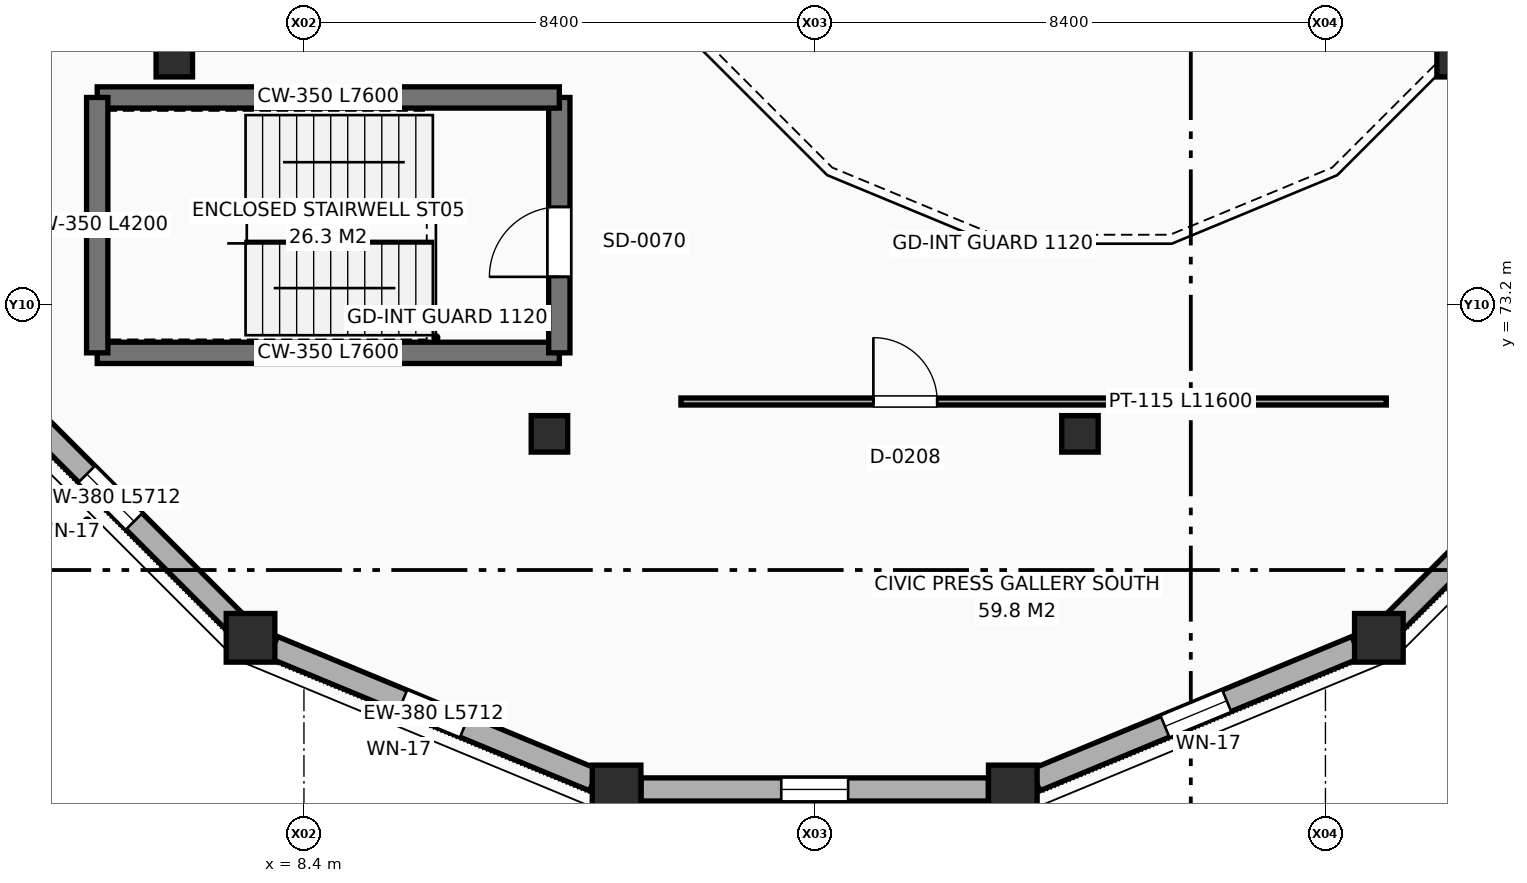
"""IFC4 building model, lengths in metres.
Left out: names, types, materials, properties, quantities, classifications, styles, units other than length and angle.
Written with IfcOpenShell. Run it as: python <this file> out.ifc"""

import sys

from ifc_helpers import new_model, si_unit, direction, frame, frame_2d, origin, origin_2d, place, context, subcontext, project, spatial, rectangle, circle, extrude, element, fill, save


model = new_model("IFC4")
c1 = context("Model", 3, precision=1e-05, world=origin(), true_north=direction((0.0, 1.0)))
c2 = subcontext(c1, "Body", "Model", "MODEL_VIEW")
j1 = project(units=[si_unit("LENGTHUNIT", "METRE"), si_unit("PLANEANGLEUNIT", "RADIAN")], contexts=[c1])
p1 = place(None, origin())
s1 = spatial("IfcSite", under=j1, at=p1, CompositionType="ELEMENT")
p2 = place(p1, origin())
s2 = spatial("IfcBuilding", under=s1, at=p2, CompositionType="ELEMENT")
p3 = place(p2, frame((0.0, 0.0, 9.6)))
s3 = spatial("IfcBuildingStorey", under=s2, at=p3, CompositionType="ELEMENT", Elevation=9.6)
for number, where, z_axis, x_axis in (
    (1, (7.521, 67.714, 0.0), (0.0, 0.0, 1.0), (1.0, 0.0, 0.0)),
    (2, (13.542, 65.22, 0.0), (0.0, 0.0, 1.0), (1.0, 0.0, 0.0)),
    (3, (20.058, 65.22, 0.0), (0.0, 0.0, 1.0), (1.0, 0.0, 0.0)),
    (4, (26.079, 67.714, 0.0), (0.0, 0.0, 1.0), (1.0, 0.0, 0.0)),
):
    element("IfcColumn", number, at=place(p3, frame(where, z_axis=z_axis, x_axis=x_axis)), inside=s3, PredefinedType="COLUMN", context=c2, shape_type="SweptSolid", body=[
        extrude(circle(Radius=0.4, at=origin_2d()), origin(), (0.0, 0.0, 1.0), 4.2),
    ])
for number, where, z_axis, x_axis in (
    (5, (6.268, 77.237, 0.0), (0.0, 0.0, 1.0), (1.0, 0.0, 0.0)),
    (6, (12.438, 71.068, 0.0), (0.0, 0.0, 1.0), (1.0, 0.0, 0.0)),
    (7, (21.163, 71.068, 0.0), (0.0, 0.0, 1.0), (1.0, 0.0, 0.0)),
    (8, (27.332, 77.237, 0.0), (0.0, 0.0, 1.0), (1.0, 0.0, 0.0)),
):
    element("IfcColumn", number, at=place(p3, frame(where, z_axis=z_axis, x_axis=x_axis)), inside=s3, PredefinedType="COLUMN", context=c2, shape_type="SweptSolid", body=[
        extrude(circle(Radius=0.3, at=origin_2d()), origin(), (0.0, 0.0, 1.0), 4.2),
    ])
p4 = place(p3, frame((3.198, 72.037, 0.0), z_axis=(0.0, 0.0, 1.0), x_axis=(0.707128150708, -0.707085411019, 0.0)))
e9 = element("IfcWall", 9, at=p4, inside=s3, PredefinedType="SOLIDWALL", context=c2, shape_type="SweptSolid", body=[
    extrude(rectangle(XDim=5.712, YDim=0.38, at=frame_2d((2.856, 0.0))), origin(), (0.0, 0.0, 1.0), 3.13),
])
p5 = place(p4, frame((2.306, 0.0, 0.9)))
e10 = element("IfcOpeningElement", 10, at=p5, cuts=e9, PredefinedType="OPENING", context=c2, shape_type="SweptSolid", body=[
    extrude(rectangle(XDim=1.1, YDim=1.8, at=frame_2d((0.55, 0.9))), frame((0.0, 0.2, 0.0), z_axis=(0.0, -1.0, 0.0), x_axis=(1.0, 0.0, 0.0)), (0.0, 0.0, 1.0), 0.4),
])
p6 = place(p3, frame((7.893, 67.56, 0.0), z_axis=(0.0, 0.0, 1.0), x_axis=(0.923880357201, -0.382681441383, 0.0)))
e11 = element("IfcWall", 11, at=p6, inside=s3, PredefinedType="SOLIDWALL", context=c2, shape_type="SweptSolid", body=[
    extrude(rectangle(XDim=5.712, YDim=0.38, at=frame_2d((2.856, 0.0))), origin(), (0.0, 0.0, 1.0), 3.13),
])
p7 = place(p6, frame((2.306, 0.0, 0.9)))
e12 = element("IfcOpeningElement", 12, at=p7, cuts=e11, PredefinedType="OPENING", context=c2, shape_type="SweptSolid", body=[
    extrude(rectangle(XDim=1.1, YDim=1.8, at=frame_2d((0.55, 0.9))), frame((0.0, 0.2, 0.0), z_axis=(0.0, -1.0, 0.0), x_axis=(1.0, 0.0, 0.0)), (0.0, 0.0, 1.0), 0.4),
])
p8 = place(p3, frame((13.944, 65.22, 0.0), z_axis=(0.0, 0.0, 1.0), x_axis=(1.0, 0.0, 0.0)))
e13 = element("IfcWall", 13, at=p8, inside=s3, PredefinedType="SOLIDWALL", context=c2, shape_type="SweptSolid", body=[
    extrude(rectangle(XDim=5.712, YDim=0.38, at=frame_2d((2.856, 0.0))), origin(), (0.0, 0.0, 1.0), 3.13),
])
p9 = place(p8, frame((2.306, 0.0, 0.9)))
e14 = element("IfcOpeningElement", 14, at=p9, cuts=e13, PredefinedType="OPENING", context=c2, shape_type="SweptSolid", body=[
    extrude(rectangle(XDim=1.1, YDim=1.8, at=frame_2d((0.55, 0.9))), frame((0.0, 0.2, 0.0), z_axis=(0.0, -1.0, 0.0), x_axis=(1.0, 0.0, 0.0)), (0.0, 0.0, 1.0), 0.4),
])
p10 = place(p3, frame((20.43, 65.374, 0.0), z_axis=(0.0, 0.0, 1.0), x_axis=(0.923874097972, 0.382696552241, 0.0)))
e15 = element("IfcWall", 15, at=p10, inside=s3, PredefinedType="SOLIDWALL", context=c2, shape_type="SweptSolid", body=[
    extrude(rectangle(XDim=5.712, YDim=0.38, at=frame_2d((2.856, 0.0))), origin(), (0.0, 0.0, 1.0), 3.13),
])
p11 = place(p10, frame((2.306, 0.0, 0.9)))
e16 = element("IfcOpeningElement", 16, at=p11, cuts=e15, PredefinedType="OPENING", context=c2, shape_type="SweptSolid", body=[
    extrude(rectangle(XDim=1.1, YDim=1.8, at=frame_2d((0.55, 0.9))), frame((0.0, 0.2, 0.0), z_axis=(0.0, -1.0, 0.0), x_axis=(1.0, 0.0, 0.0)), (0.0, 0.0, 1.0), 0.4),
])
p12 = place(p3, frame((26.363, 67.998, 0.0), z_axis=(0.0, 0.0, 1.0), x_axis=(0.707128150708, 0.707085411019, 0.0)))
e17 = element("IfcWall", 17, at=p12, inside=s3, PredefinedType="SOLIDWALL", context=c2, shape_type="SweptSolid", body=[
    extrude(rectangle(XDim=5.712, YDim=0.38, at=frame_2d((2.856, 0.0))), origin(), (0.0, 0.0, 1.0), 3.13),
])
p13 = place(p12, frame((2.306, 0.0, 0.9)))
e18 = element("IfcOpeningElement", 18, at=p13, cuts=e17, PredefinedType="OPENING", context=c2, shape_type="SweptSolid", body=[
    extrude(rectangle(XDim=1.1, YDim=1.8, at=frame_2d((0.55, 0.9))), frame((0.0, 0.2, 0.0), z_axis=(0.0, -1.0, 0.0), x_axis=(1.0, 0.0, 0.0)), (0.0, 0.0, 1.0), 0.4),
])
p14 = place(p3, frame((5.0, 72.4, 0.0), z_axis=(0.0, 0.0, 1.0), x_axis=(1.0, 0.0, 0.0)))
e19 = element("IfcWall", 19, at=p14, inside=s3, PredefinedType="SHEAR", context=c2, shape_type="SweptSolid", body=[
    extrude(rectangle(XDim=7.6, YDim=0.35, at=frame_2d((3.8, 0.0))), origin(), (0.0, 0.0, 1.0), 3.92),
])
p15 = place(p3, frame((12.6, 72.4, 0.0), z_axis=(0.0, 0.0, 1.0), x_axis=(0.0, 1.0, 0.0)))
e20 = element("IfcWall", 20, at=p15, inside=s3, PredefinedType="SHEAR", context=c2, shape_type="SweptSolid", body=[
    extrude(rectangle(XDim=4.2, YDim=0.35, at=frame_2d((2.1, 0.0))), origin(), (0.0, 0.0, 1.0), 3.92),
])
p16 = place(p15, frame((1.25, 0.0, 0.0)))
e21 = element("IfcOpeningElement", 21, at=p16, cuts=e20, PredefinedType="OPENING", context=c2, shape_type="SweptSolid", body=[
    extrude(rectangle(XDim=1.15, YDim=2.2, at=frame_2d((0.575, 1.1))), frame((0.0, 0.185, 0.0), z_axis=(0.0, -1.0, 0.0), x_axis=(1.0, 0.0, 0.0)), (0.0, 0.0, 1.0), 0.37),
])
p17 = place(p3, frame((12.6, 76.6, 0.0), z_axis=(0.0, 0.0, 1.0), x_axis=(-1.0, 0.0, 0.0)))
e22 = element("IfcWall", 22, at=p17, inside=s3, PredefinedType="SHEAR", context=c2, shape_type="SweptSolid", body=[
    extrude(rectangle(XDim=7.6, YDim=0.35, at=frame_2d((3.8, 0.0))), origin(), (0.0, 0.0, 1.0), 3.92),
])
p18 = place(p3, frame((5.0, 76.6, 0.0), z_axis=(0.0, 0.0, 1.0), x_axis=(0.0, -1.0, 0.0)))
e23 = element("IfcWall", 23, at=p18, inside=s3, PredefinedType="SHEAR", context=c2, shape_type="SweptSolid", body=[
    extrude(rectangle(XDim=4.2, YDim=0.35, at=frame_2d((2.1, 0.0))), origin(), (0.0, 0.0, 1.0), 3.92),
])
p19 = place(p3, frame((14.6, 71.6, 0.0), z_axis=(0.0, 0.0, 1.0), x_axis=(1.0, 0.0, 0.0)))
e24 = element("IfcWall", 24, at=p19, inside=s3, PredefinedType="PARTITIONING", context=c2, shape_type="SweptSolid", body=[
    extrude(rectangle(XDim=11.6, YDim=0.115, at=frame_2d((5.8, 0.0))), origin(), (0.0, 0.0, 1.0), 3.86),
])
p20 = place(p19, frame((3.165, 0.0, 0.0)))
e25 = element("IfcOpeningElement", 25, at=p20, cuts=e24, PredefinedType="OPENING", context=c2, shape_type="SweptSolid", body=[
    extrude(rectangle(XDim=1.05, YDim=2.15, at=frame_2d((0.525, 1.075))), frame((0.0, 0.067, 0.0), z_axis=(0.0, -1.0, 0.0), x_axis=(1.0, 0.0, 0.0)), (0.0, 0.0, 1.0), 0.135),
])
p21 = place(p5, origin())
e26 = element("IfcWindow", 26, at=p21, inside=s3, PartitioningType="SINGLE_PANEL", PredefinedType="WINDOW", context=c2, shape_type="SweptSolid", body=[
    extrude(rectangle(XDim=1.1, YDim=1.8, at=frame_2d((0.55, 0.9))), frame((0.0, 0.03, 0.0), z_axis=(0.0, -1.0, 0.0), x_axis=(1.0, 0.0, 0.0)), (0.0, 0.0, 1.0), 0.06),
])
fill(e10, e26)
p22 = place(p7, origin())
e27 = element("IfcWindow", 27, at=p22, inside=s3, PartitioningType="SINGLE_PANEL", PredefinedType="WINDOW", context=c2, shape_type="SweptSolid", body=[
    extrude(rectangle(XDim=1.1, YDim=1.8, at=frame_2d((0.55, 0.9))), frame((0.0, 0.03, 0.0), z_axis=(0.0, -1.0, 0.0), x_axis=(1.0, 0.0, 0.0)), (0.0, 0.0, 1.0), 0.06),
])
fill(e12, e27)
p23 = place(p9, origin())
e28 = element("IfcWindow", 28, at=p23, inside=s3, PartitioningType="SINGLE_PANEL", PredefinedType="WINDOW", context=c2, shape_type="SweptSolid", body=[
    extrude(rectangle(XDim=1.1, YDim=1.8, at=frame_2d((0.55, 0.9))), frame((0.0, 0.03, 0.0), z_axis=(0.0, -1.0, 0.0), x_axis=(1.0, 0.0, 0.0)), (0.0, 0.0, 1.0), 0.06),
])
fill(e14, e28)
p24 = place(p11, origin())
e29 = element("IfcWindow", 29, at=p24, inside=s3, PartitioningType="SINGLE_PANEL", PredefinedType="WINDOW", context=c2, shape_type="SweptSolid", body=[
    extrude(rectangle(XDim=1.1, YDim=1.8, at=frame_2d((0.55, 0.9))), frame((0.0, 0.03, 0.0), z_axis=(0.0, -1.0, 0.0), x_axis=(1.0, 0.0, 0.0)), (0.0, 0.0, 1.0), 0.06),
])
fill(e16, e29)
p25 = place(p16, origin())
e30 = element("IfcDoor", 30, at=p25, inside=s3, OperationType="SINGLE_SWING_LEFT", PredefinedType="DOOR", context=c2, shape_type="SweptSolid", body=[
    extrude(rectangle(XDim=1.15, YDim=2.2, at=frame_2d((0.575, 1.1))), frame((0.0, 0.025, 0.0), z_axis=(0.0, -1.0, 0.0), x_axis=(1.0, 0.0, 0.0)), (0.0, 0.0, 1.0), 0.05),
])
fill(e21, e30)
p26 = place(p20, origin())
e31 = element("IfcDoor", 31, at=p26, inside=s3, OperationType="SINGLE_SWING_LEFT", PredefinedType="DOOR", context=c2, shape_type="SweptSolid", body=[
    extrude(rectangle(XDim=1.05, YDim=2.15, at=frame_2d((0.525, 1.075))), frame((0.0, 0.025, 0.0), z_axis=(0.0, -1.0, 0.0), x_axis=(1.0, 0.0, 0.0)), (0.0, 0.0, 1.0), 0.05),
])
fill(e25, e31)
save(model, sys.argv[1])
